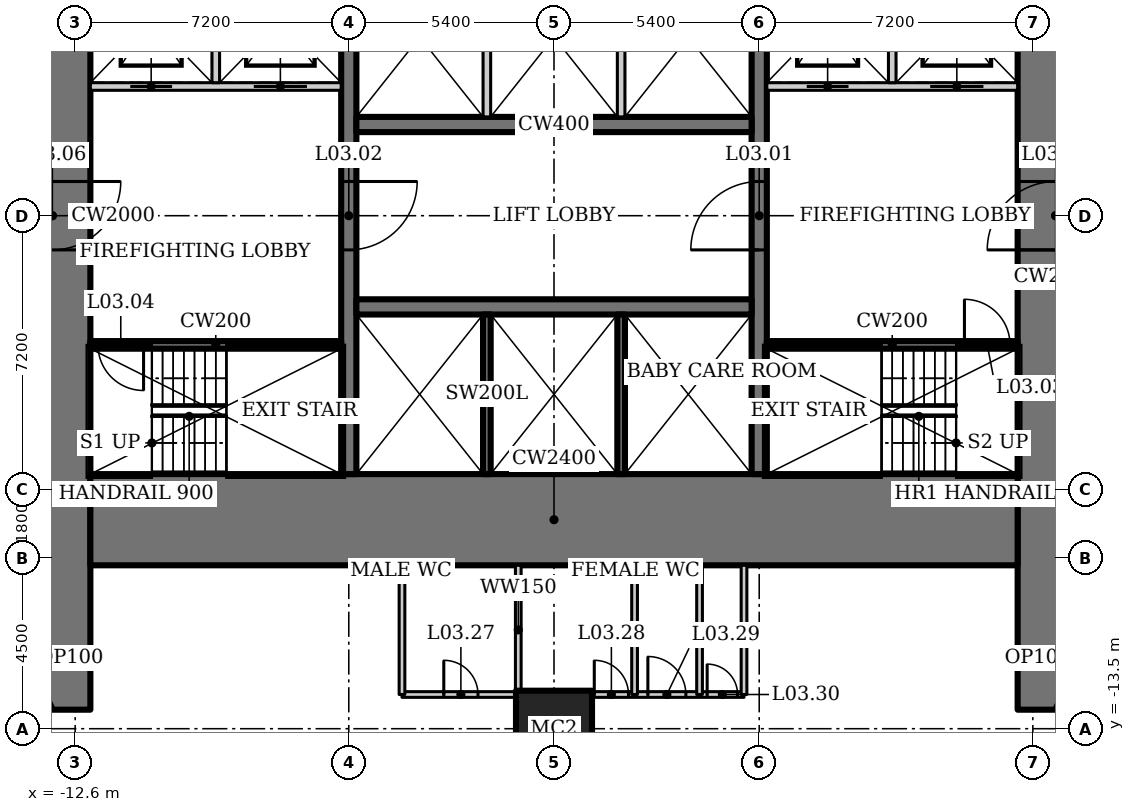
"""IFC4 building model, lengths in metres.
Left out: names, types, materials, properties, quantities, classifications, styles, units other than length and angle.
Written with IfcOpenShell. Run it as: python <this file> out.ifc"""

import sys

from ifc_helpers import new_model, si_unit, direction, frame, frame_2d, origin, origin_2d, place, context, subcontext, project, spatial, rectangle, hollow_rectangle, extrude, element, fill, save


model = new_model("IFC4")
c1 = context("Model", 3, precision=1e-05, world=origin(), true_north=direction((0.0, 1.0)))
c2 = subcontext(c1, "Body", "Model", "MODEL_VIEW")
j1 = project(units=[si_unit("LENGTHUNIT", "METRE"), si_unit("PLANEANGLEUNIT", "RADIAN")], contexts=[c1])
p1 = place(None, origin())
s1 = spatial("IfcSite", under=j1, at=p1, CompositionType="ELEMENT")
p2 = place(p1, origin())
s2 = spatial("IfcBuilding", under=s1, at=p2, CompositionType="ELEMENT")
p3 = place(p2, frame((0.0, 0.0, 22.0)))
s3 = spatial("IfcBuildingStorey", under=s2, at=p3, CompositionType="ELEMENT", Elevation=22.0)
p4 = place(p3, frame((0.0, -13.5, 0.0), z_axis=(0.0, 0.0, 1.0), x_axis=(1.0, 0.0, 0.0)))
e1 = element("IfcColumn", 1, at=p4, inside=s3, PredefinedType="COLUMN", context=c2, shape_type="SweptSolid", body=[
    extrude(hollow_rectangle(XDim=2.0, YDim=2.0, WallThickness=0.17, at=origin_2d()), origin(), (0.0, 0.0, 1.0), 5.0),
])
p5 = place(p3, frame((13.2, -13.0, 0.0), z_axis=(0.0, 0.0, 1.0), x_axis=(0.0, 1.0, 0.0)))
e2 = element("IfcWall", 2, at=p5, inside=s3, PredefinedType="SHEAR", context=c2, shape_type="SweptSolid", body=[
    extrude(rectangle(XDim=26.0, YDim=2.0, at=frame_2d((13.0, 0.0))), origin(), (0.0, 0.0, 1.0), 5.0),
])
p6 = place(p5, frame((12.1, 0.0, 0.0)))
e3 = element("IfcOpeningElement", 3, at=p6, cuts=e2, PredefinedType="OPENING", context=c2, shape_type="SweptSolid", body=[
    extrude(rectangle(XDim=1.8, YDim=2.1, at=frame_2d((0.9, 1.05))), frame((0.0, 1.01, 0.0), z_axis=(0.0, -1.0, 0.0), x_axis=(1.0, 0.0, 0.0)), (0.0, 0.0, 1.0), 2.02),
])
p7 = place(p3, frame((-13.2, 13.0, 0.0), z_axis=(0.0, 0.0, 1.0), x_axis=(0.0, -1.0, 0.0)))
e4 = element("IfcWall", 4, at=p7, inside=s3, PredefinedType="SHEAR", context=c2, shape_type="SweptSolid", body=[
    extrude(rectangle(XDim=26.0, YDim=2.0, at=frame_2d((13.0, 0.0))), origin(), (0.0, 0.0, 1.0), 5.0),
])
p8 = place(p7, frame((12.1, 0.0, 0.0)))
e5 = element("IfcOpeningElement", 5, at=p8, cuts=e4, PredefinedType="OPENING", context=c2, shape_type="SweptSolid", body=[
    extrude(rectangle(XDim=1.8, YDim=2.1, at=frame_2d((0.9, 1.05))), frame((0.0, 1.01, 0.0), z_axis=(0.0, -1.0, 0.0), x_axis=(1.0, 0.0, 0.0)), (0.0, 0.0, 1.0), 2.02),
])
p9 = place(p3, frame((-12.2, -8.0, 0.0), z_axis=(0.0, 0.0, 1.0), x_axis=(1.0, 0.0, 0.0)))
e6 = element("IfcWall", 6, at=p9, inside=s3, PredefinedType="SHEAR", context=c2, shape_type="SweptSolid", body=[
    extrude(rectangle(XDim=24.4, YDim=2.4, at=frame_2d((12.2, 0.0))), origin(), (0.0, 0.0, 1.0), 5.0),
])
p10 = place(p3, frame((5.4, -6.8, 0.0), z_axis=(0.0, 0.0, 1.0), x_axis=(0.0, 1.0, 0.0)))
e7 = element("IfcWall", 7, at=p10, inside=s3, PredefinedType="SHEAR", context=c2, shape_type="SweptSolid", body=[
    extrude(rectangle(XDim=13.6, YDim=0.4, at=frame_2d((6.8, 0.0))), origin(), (0.0, 0.0, 1.0), 5.0),
])
p11 = place(p10, frame((5.9, 0.0, 0.0)))
e8 = element("IfcOpeningElement", 8, at=p11, cuts=e7, PredefinedType="OPENING", context=c2, shape_type="SweptSolid", body=[
    extrude(rectangle(XDim=1.8, YDim=2.1, at=frame_2d((0.9, 1.05))), frame((0.0, 0.21, 0.0), z_axis=(0.0, -1.0, 0.0), x_axis=(1.0, 0.0, 0.0)), (0.0, 0.0, 1.0), 0.42),
])
p12 = place(p3, frame((-5.4, 6.8, 0.0), z_axis=(0.0, 0.0, 1.0), x_axis=(0.0, -1.0, 0.0)))
e9 = element("IfcWall", 9, at=p12, inside=s3, PredefinedType="SHEAR", context=c2, shape_type="SweptSolid", body=[
    extrude(rectangle(XDim=13.6, YDim=0.4, at=frame_2d((6.8, 0.0))), origin(), (0.0, 0.0, 1.0), 5.0),
])
p13 = place(p12, frame((5.9, 0.0, 0.0)))
e10 = element("IfcOpeningElement", 10, at=p13, cuts=e9, PredefinedType="OPENING", context=c2, shape_type="SweptSolid", body=[
    extrude(rectangle(XDim=1.8, YDim=2.1, at=frame_2d((0.9, 1.05))), frame((0.0, 0.21, 0.0), z_axis=(0.0, -1.0, 0.0), x_axis=(1.0, 0.0, 0.0)), (0.0, 0.0, 1.0), 0.42),
])
p14 = place(p3, frame((-5.2, -2.4, 0.0), z_axis=(0.0, 0.0, 1.0), x_axis=(1.0, 0.0, 0.0)))
e11 = element("IfcWall", 11, at=p14, inside=s3, PredefinedType="SHEAR", context=c2, shape_type="SweptSolid", body=[
    extrude(rectangle(XDim=10.4, YDim=0.4, at=frame_2d((5.2, 0.0))), origin(), (0.0, 0.0, 1.0), 5.0),
])
for number, where, z_axis, x_axis in (
    (12, (-1.767, -2.6, 0.0), (0.0, 0.0, 1.0), (0.0, -1.0, 0.0)),
    (13, (1.767, -2.6, 0.0), (0.0, 0.0, 1.0), (0.0, -1.0, 0.0)),
):
    element("IfcWall", number, at=place(p3, frame(where, z_axis=z_axis, x_axis=x_axis)), inside=s3, PredefinedType="SOLIDWALL", context=c2, shape_type="SweptSolid", body=[
        extrude(rectangle(XDim=4.2, YDim=0.2, at=frame_2d((2.1, 0.0))), origin(), (0.0, 0.0, 1.0), 5.0),
    ])
p15 = place(p3, frame((5.2, 2.4, 0.0), z_axis=(0.0, 0.0, 1.0), x_axis=(-1.0, 0.0, 0.0)))
e14 = element("IfcWall", 14, at=p15, inside=s3, PredefinedType="SHEAR", context=c2, shape_type="SweptSolid", body=[
    extrude(rectangle(XDim=10.4, YDim=0.4, at=frame_2d((5.2, 0.0))), origin(), (0.0, 0.0, 1.0), 5.0),
])
for number, where, z_axis, x_axis in (
    (15, (-1.767, 2.6, 0.0), (0.0, 0.0, 1.0), (0.0, 1.0, 0.0)),
    (16, (1.767, 2.6, 0.0), (0.0, 0.0, 1.0), (0.0, 1.0, 0.0)),
):
    element("IfcWall", number, at=place(p3, frame(where, z_axis=z_axis, x_axis=x_axis)), inside=s3, PredefinedType="SOLIDWALL", context=c2, shape_type="SweptSolid", body=[
        extrude(rectangle(XDim=4.2, YDim=0.2, at=frame_2d((2.1, 0.0))), origin(), (0.0, 0.0, 1.0), 5.0),
    ])
p16 = place(p3, frame((5.6, -3.4, 0.0), z_axis=(0.0, 0.0, 1.0), x_axis=(1.0, 0.0, 0.0)))
e17 = element("IfcWall", 17, at=p16, inside=s3, PredefinedType="SHEAR", context=c2, shape_type="SweptSolid", body=[
    extrude(rectangle(XDim=6.6, YDim=0.2, at=frame_2d((3.3, 0.0))), origin(), (0.0, 0.0, 1.0), 5.0),
])
p17 = place(p16, frame((5.2, 0.0, 0.0)))
e18 = element("IfcOpeningElement", 18, at=p17, cuts=e17, PredefinedType="OPENING", context=c2, shape_type="SweptSolid", body=[
    extrude(rectangle(XDim=1.2, YDim=2.1, at=frame_2d((0.6, 1.05))), frame((0.0, 0.11, 0.0), z_axis=(0.0, -1.0, 0.0), x_axis=(1.0, 0.0, 0.0)), (0.0, 0.0, 1.0), 0.22),
])
p18 = place(p3, frame((12.2, 3.4, 0.0), z_axis=(0.0, 0.0, 1.0), x_axis=(-1.0, 0.0, 0.0)))
e19 = element("IfcWall", 19, at=p18, inside=s3, PredefinedType="SOLIDWALL", context=c2, shape_type="SweptSolid", body=[
    extrude(rectangle(XDim=6.6, YDim=0.2, at=frame_2d((3.3, 0.0))), origin(), (0.0, 0.0, 1.0), 5.0),
])
p19 = place(p18, frame((4.45, 0.0, 0.0)))
e20 = element("IfcOpeningElement", 20, at=p19, cuts=e19, PredefinedType="OPENING", context=c2, shape_type="SweptSolid", body=[
    extrude(rectangle(XDim=1.1, YDim=2.2, at=frame_2d((0.55, 1.1))), frame((0.0, 0.11, 0.0), z_axis=(0.0, -1.0, 0.0), x_axis=(1.0, 0.0, 0.0)), (0.0, 0.0, 1.0), 0.22),
])
p20 = place(p18, frame((0.9, 0.0, 0.0)))
e21 = element("IfcOpeningElement", 21, at=p20, cuts=e19, PredefinedType="OPENING", context=c2, shape_type="SweptSolid", body=[
    extrude(rectangle(XDim=1.4, YDim=2.2, at=frame_2d((0.7, 1.1))), frame((0.0, 0.11, 0.0), z_axis=(0.0, -1.0, 0.0), x_axis=(1.0, 0.0, 0.0)), (0.0, 0.0, 1.0), 0.22),
])
p21 = place(p3, frame((8.9, 3.5, 0.0), z_axis=(0.0, 0.0, 1.0), x_axis=(0.0, 1.0, 0.0)))
e22 = element("IfcWall", 22, at=p21, inside=s3, PredefinedType="SOLIDWALL", context=c2, shape_type="SweptSolid", body=[
    extrude(rectangle(XDim=3.3, YDim=0.2, at=frame_2d((1.65, 0.0))), origin(), (0.0, 0.0, 1.0), 5.0),
])
p22 = place(p3, frame((-5.6, -3.4, 0.0), z_axis=(0.0, 0.0, 1.0), x_axis=(-1.0, 0.0, 0.0)))
e23 = element("IfcWall", 23, at=p22, inside=s3, PredefinedType="SHEAR", context=c2, shape_type="SweptSolid", body=[
    extrude(rectangle(XDim=6.6, YDim=0.2, at=frame_2d((3.3, 0.0))), origin(), (0.0, 0.0, 1.0), 5.0),
])
p23 = place(p22, frame((5.2, 0.0, 0.0)))
e24 = element("IfcOpeningElement", 24, at=p23, cuts=e23, PredefinedType="OPENING", context=c2, shape_type="SweptSolid", body=[
    extrude(rectangle(XDim=1.2, YDim=2.1, at=frame_2d((0.6, 1.05))), frame((0.0, 0.11, 0.0), z_axis=(0.0, -1.0, 0.0), x_axis=(1.0, 0.0, 0.0)), (0.0, 0.0, 1.0), 0.22),
])
p24 = place(p3, frame((-12.2, 3.4, 0.0), z_axis=(0.0, 0.0, 1.0), x_axis=(1.0, 0.0, 0.0)))
e25 = element("IfcWall", 25, at=p24, inside=s3, PredefinedType="SOLIDWALL", context=c2, shape_type="SweptSolid", body=[
    extrude(rectangle(XDim=6.6, YDim=0.2, at=frame_2d((3.3, 0.0))), origin(), (0.0, 0.0, 1.0), 5.0),
])
p25 = place(p24, frame((1.05, 0.0, 0.0)))
e26 = element("IfcOpeningElement", 26, at=p25, cuts=e25, PredefinedType="OPENING", context=c2, shape_type="SweptSolid", body=[
    extrude(rectangle(XDim=1.1, YDim=2.2, at=frame_2d((0.55, 1.1))), frame((0.0, 0.11, 0.0), z_axis=(0.0, -1.0, 0.0), x_axis=(1.0, 0.0, 0.0)), (0.0, 0.0, 1.0), 0.22),
])
p26 = place(p24, frame((4.3, 0.0, 0.0)))
e27 = element("IfcOpeningElement", 27, at=p26, cuts=e25, PredefinedType="OPENING", context=c2, shape_type="SweptSolid", body=[
    extrude(rectangle(XDim=1.4, YDim=2.2, at=frame_2d((0.7, 1.1))), frame((0.0, 0.11, 0.0), z_axis=(0.0, -1.0, 0.0), x_axis=(1.0, 0.0, 0.0)), (0.0, 0.0, 1.0), 0.22),
])
p27 = place(p3, frame((-8.9, 3.5, 0.0), z_axis=(0.0, 0.0, 1.0), x_axis=(0.0, 1.0, 0.0)))
e28 = element("IfcWall", 28, at=p27, inside=s3, PredefinedType="SOLIDWALL", context=c2, shape_type="SweptSolid", body=[
    extrude(rectangle(XDim=3.3, YDim=0.2, at=frame_2d((1.65, 0.0))), origin(), (0.0, 0.0, 1.0), 5.0),
])
p28 = place(p3, frame((-4.0, -12.6, 0.0), z_axis=(0.0, 0.0, 1.0), x_axis=(1.0, 0.0, 0.0)))
e29 = element("IfcWall", 29, at=p28, inside=s3, PredefinedType="SOLIDWALL", context=c2, shape_type="SweptSolid", body=[
    extrude(rectangle(XDim=9.0, YDim=0.15, at=frame_2d((4.5, 0.0))), origin(), (0.0, 0.0, 1.0), 4.8),
])
p29 = place(p28, frame((1.1, 0.0, 0.0)))
e30 = element("IfcOpeningElement", 30, at=p29, cuts=e29, PredefinedType="OPENING", context=c2, shape_type="SweptSolid", body=[
    extrude(rectangle(XDim=0.9, YDim=2.1, at=frame_2d((0.45, 1.05))), frame((0.0, 0.085, 0.0), z_axis=(0.0, -1.0, 0.0), x_axis=(1.0, 0.0, 0.0)), (0.0, 0.0, 1.0), 0.17),
])
p30 = place(p28, frame((5.06, 0.0, 0.0)))
e31 = element("IfcOpeningElement", 31, at=p30, cuts=e29, PredefinedType="OPENING", context=c2, shape_type="SweptSolid", body=[
    extrude(rectangle(XDim=0.9, YDim=2.1, at=frame_2d((0.45, 1.05))), frame((0.0, 0.085, 0.0), z_axis=(0.0, -1.0, 0.0), x_axis=(1.0, 0.0, 0.0)), (0.0, 0.0, 1.0), 0.17),
])
p31 = place(p28, frame((6.47, 0.0, 0.0)))
e32 = element("IfcOpeningElement", 32, at=p31, cuts=e29, PredefinedType="OPENING", context=c2, shape_type="SweptSolid", body=[
    extrude(rectangle(XDim=1.0, YDim=2.1, at=frame_2d((0.5, 1.05))), frame((0.0, 0.085, 0.0), z_axis=(0.0, -1.0, 0.0), x_axis=(1.0, 0.0, 0.0)), (0.0, 0.0, 1.0), 0.17),
])
p32 = place(p28, frame((8.03, 0.0, 0.0)))
e33 = element("IfcOpeningElement", 33, at=p32, cuts=e29, PredefinedType="OPENING", context=c2, shape_type="SweptSolid", body=[
    extrude(rectangle(XDim=0.8, YDim=2.1, at=frame_2d((0.4, 1.05))), frame((0.0, 0.085, 0.0), z_axis=(0.0, -1.0, 0.0), x_axis=(1.0, 0.0, 0.0)), (0.0, 0.0, 1.0), 0.17),
])
for number, where, z_axis, x_axis in (
    (34, (-4.0, -9.2, 0.0), (0.0, 0.0, 1.0), (0.0, -1.0, 0.0)),
    (35, (5.0, -9.2, 0.0), (0.0, 0.0, 1.0), (0.0, -1.0, 0.0)),
    (36, (-0.94, -9.2, 0.0), (0.0, 0.0, 1.0), (0.0, -1.0, 0.0)),
):
    element("IfcWall", number, at=place(p3, frame(where, z_axis=z_axis, x_axis=x_axis)), inside=s3, PredefinedType="SOLIDWALL", context=c2, shape_type="SweptSolid", body=[
        extrude(rectangle(XDim=3.4, YDim=0.15, at=frame_2d((1.7, 0.0))), origin(), (0.0, 0.0, 1.0), 4.8),
    ])
p33 = place(p3, frame((2.12, -9.2, 0.0), z_axis=(0.0, 0.0, 1.0), x_axis=(0.0, -1.0, 0.0)))
e37 = element("IfcWall", 37, at=p33, inside=s3, PredefinedType="SOLIDWALL", context=c2, shape_type="SweptSolid", body=[
    extrude(rectangle(XDim=3.4, YDim=0.15, at=frame_2d((1.7, 0.0))), origin(), (0.0, 0.0, 1.0), 4.03),
])
p34 = place(p3, frame((3.83, -9.2, 0.0), z_axis=(0.0, 0.0, 1.0), x_axis=(0.0, -1.0, 0.0)))
e38 = element("IfcWall", 38, at=p34, inside=s3, PredefinedType="SOLIDWALL", context=c2, shape_type="SweptSolid", body=[
    extrude(rectangle(XDim=3.4, YDim=0.15, at=frame_2d((1.7, 0.0))), origin(), (0.0, 0.0, 1.0), 4.8),
])
for number, where, z_axis, x_axis in (
    (39, (13.2, -13.0, 0.0), (0.0, 0.0, 1.0), (0.42, 0.907, 0.0)),
    (40, (-13.2, -13.0, 0.0), (0.0, 0.0, 1.0), (-0.42, 0.907, 0.0)),
):
    element("IfcWall", number, at=place(p3, frame(where, z_axis=z_axis, x_axis=x_axis)), inside=s3, PredefinedType="PARTITIONING", context=c2, shape_type="SweptSolid", body=[
        extrude(rectangle(XDim=2.975, YDim=0.1, at=frame_2d((1.488, 0.0))), origin(), (0.0, 0.0, 1.0), 4.8),
    ])
p35 = place(p11, origin())
e41 = element("IfcDoor", 41, at=p35, inside=s3, OperationType="DOUBLE_DOOR_DOUBLE_SWING", PredefinedType="DOOR", context=c2, shape_type="SweptSolid", body=[
    extrude(rectangle(XDim=1.8, YDim=2.1, at=frame_2d((0.9, 1.05))), frame((0.0, 0.025, 0.0), z_axis=(0.0, -1.0, 0.0), x_axis=(1.0, 0.0, 0.0)), (0.0, 0.0, 1.0), 0.05),
])
fill(e8, e41)
p36 = place(p13, origin())
e42 = element("IfcDoor", 42, at=p36, inside=s3, OperationType="DOUBLE_DOOR_DOUBLE_SWING", PredefinedType="DOOR", context=c2, shape_type="SweptSolid", body=[
    extrude(rectangle(XDim=1.8, YDim=2.1, at=frame_2d((0.9, 1.05))), frame((0.0, 0.025, 0.0), z_axis=(0.0, -1.0, 0.0), x_axis=(1.0, 0.0, 0.0)), (0.0, 0.0, 1.0), 0.05),
])
fill(e10, e42)
p37 = place(p17, origin())
e43 = element("IfcDoor", 43, at=p37, inside=s3, OperationType="SINGLE_SWING_RIGHT", PredefinedType="DOOR", context=c2, shape_type="SweptSolid", body=[
    extrude(rectangle(XDim=1.2, YDim=2.1, at=frame_2d((0.6, 1.05))), frame((0.0, 0.025, 0.0), z_axis=(0.0, -1.0, 0.0), x_axis=(1.0, 0.0, 0.0)), (0.0, 0.0, 1.0), 0.05),
])
fill(e18, e43)
p38 = place(p23, origin())
e44 = element("IfcDoor", 44, at=p38, inside=s3, OperationType="SINGLE_SWING_RIGHT", PredefinedType="DOOR", context=c2, shape_type="SweptSolid", body=[
    extrude(rectangle(XDim=1.2, YDim=2.1, at=frame_2d((0.6, 1.05))), frame((0.0, 0.025, 0.0), z_axis=(0.0, -1.0, 0.0), x_axis=(1.0, 0.0, 0.0)), (0.0, 0.0, 1.0), 0.05),
])
fill(e24, e44)
p39 = place(p6, origin())
e45 = element("IfcDoor", 45, at=p39, inside=s3, OperationType="DOUBLE_DOOR_DOUBLE_SWING", PredefinedType="DOOR", context=c2, shape_type="SweptSolid", body=[
    extrude(rectangle(XDim=1.8, YDim=2.1, at=frame_2d((0.9, 1.05))), frame((0.0, 0.025, 0.0), z_axis=(0.0, -1.0, 0.0), x_axis=(1.0, 0.0, 0.0)), (0.0, 0.0, 1.0), 0.05),
])
fill(e3, e45)
p40 = place(p8, origin())
e46 = element("IfcDoor", 46, at=p40, inside=s3, OperationType="DOUBLE_DOOR_DOUBLE_SWING", PredefinedType="DOOR", context=c2, shape_type="SweptSolid", body=[
    extrude(rectangle(XDim=1.8, YDim=2.1, at=frame_2d((0.9, 1.05))), frame((0.0, 0.025, 0.0), z_axis=(0.0, -1.0, 0.0), x_axis=(1.0, 0.0, 0.0)), (0.0, 0.0, 1.0), 0.05),
])
fill(e5, e46)
p41 = place(p25, origin())
e47 = element("IfcDoor", 47, at=p41, inside=s3, OperationType="DOUBLE_DOOR_SLIDING", PredefinedType="DOOR", context=c2, shape_type="SweptSolid", body=[
    extrude(rectangle(XDim=1.1, YDim=2.2, at=frame_2d((0.55, 1.1))), frame((0.0, 0.025, 0.0), z_axis=(0.0, -1.0, 0.0), x_axis=(1.0, 0.0, 0.0)), (0.0, 0.0, 1.0), 0.05),
])
fill(e26, e47)
p42 = place(p26, origin())
e48 = element("IfcDoor", 48, at=p42, inside=s3, OperationType="DOUBLE_DOOR_SLIDING", PredefinedType="DOOR", context=c2, shape_type="SweptSolid", body=[
    extrude(rectangle(XDim=1.4, YDim=2.2, at=frame_2d((0.7, 1.1))), frame((0.0, 0.025, 0.0), z_axis=(0.0, -1.0, 0.0), x_axis=(1.0, 0.0, 0.0)), (0.0, 0.0, 1.0), 0.05),
])
fill(e27, e48)
p43 = place(p19, origin())
e49 = element("IfcDoor", 49, at=p43, inside=s3, OperationType="DOUBLE_DOOR_SLIDING", PredefinedType="DOOR", context=c2, shape_type="SweptSolid", body=[
    extrude(rectangle(XDim=1.1, YDim=2.2, at=frame_2d((0.55, 1.1))), frame((0.0, 0.025, 0.0), z_axis=(0.0, -1.0, 0.0), x_axis=(1.0, 0.0, 0.0)), (0.0, 0.0, 1.0), 0.05),
])
fill(e20, e49)
p44 = place(p20, origin())
e50 = element("IfcDoor", 50, at=p44, inside=s3, OperationType="DOUBLE_DOOR_SLIDING", PredefinedType="DOOR", context=c2, shape_type="SweptSolid", body=[
    extrude(rectangle(XDim=1.4, YDim=2.2, at=frame_2d((0.7, 1.1))), frame((0.0, 0.025, 0.0), z_axis=(0.0, -1.0, 0.0), x_axis=(1.0, 0.0, 0.0)), (0.0, 0.0, 1.0), 0.05),
])
fill(e21, e50)
p45 = place(p29, origin())
e51 = element("IfcDoor", 51, at=p45, inside=s3, OperationType="SINGLE_SWING_LEFT", PredefinedType="DOOR", context=c2, shape_type="SweptSolid", body=[
    extrude(rectangle(XDim=0.9, YDim=2.1, at=frame_2d((0.45, 1.05))), frame((0.0, 0.025, 0.0), z_axis=(0.0, -1.0, 0.0), x_axis=(1.0, 0.0, 0.0)), (0.0, 0.0, 1.0), 0.05),
])
fill(e30, e51)
p46 = place(p30, origin())
e52 = element("IfcDoor", 52, at=p46, inside=s3, OperationType="SINGLE_SWING_LEFT", PredefinedType="DOOR", context=c2, shape_type="SweptSolid", body=[
    extrude(rectangle(XDim=0.9, YDim=2.1, at=frame_2d((0.45, 1.05))), frame((0.0, 0.025, 0.0), z_axis=(0.0, -1.0, 0.0), x_axis=(1.0, 0.0, 0.0)), (0.0, 0.0, 1.0), 0.05),
])
fill(e31, e52)
p47 = place(p31, origin())
e53 = element("IfcDoor", 53, at=p47, inside=s3, OperationType="SINGLE_SWING_LEFT", PredefinedType="DOOR", context=c2, shape_type="SweptSolid", body=[
    extrude(rectangle(XDim=1.0, YDim=2.1, at=frame_2d((0.5, 1.05))), frame((0.0, 0.025, 0.0), z_axis=(0.0, -1.0, 0.0), x_axis=(1.0, 0.0, 0.0)), (0.0, 0.0, 1.0), 0.05),
])
fill(e32, e53)
p48 = place(p32, origin())
e54 = element("IfcDoor", 54, at=p48, inside=s3, OperationType="SINGLE_SWING_LEFT", PredefinedType="DOOR", context=c2, shape_type="SweptSolid", body=[
    extrude(rectangle(XDim=0.8, YDim=2.1, at=frame_2d((0.4, 1.05))), frame((0.0, 0.025, 0.0), z_axis=(0.0, -1.0, 0.0), x_axis=(1.0, 0.0, 0.0)), (0.0, 0.0, 1.0), 0.05),
])
fill(e33, e54)
save(model, sys.argv[1])
